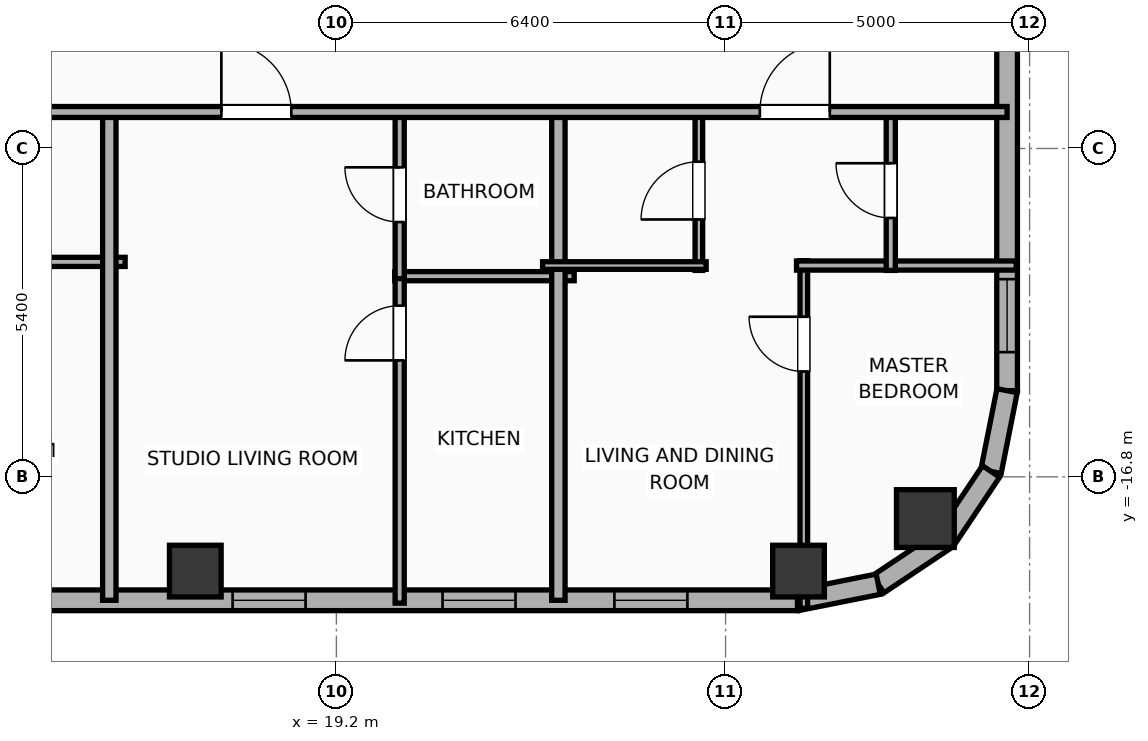
"""IFC4 building model, lengths in metres.
Left out: names, types, materials, properties, quantities, classifications, styles, units other than length and angle.
Written with IfcOpenShell. Run it as: python <this file> out.ifc"""

import sys

from ifc_helpers import new_model, si_unit, direction, frame, frame_2d, origin, origin_2d, place, context, subcontext, project, spatial, rectangle, hollow_rectangle, hollow_circle, extrude, element, fill, save


model = new_model("IFC4")
c1 = context("Model", 3, precision=1e-05, world=origin(), true_north=direction((0.0, 1.0)))
c2 = subcontext(c1, "Body", "Model", "MODEL_VIEW")
j1 = project(units=[si_unit("LENGTHUNIT", "METRE"), si_unit("PLANEANGLEUNIT", "RADIAN")], contexts=[c1])
p1 = place(None, origin())
s1 = spatial("IfcSite", under=j1, at=p1, CompositionType="ELEMENT")
p2 = place(p1, origin())
s2 = spatial("IfcBuilding", under=s1, at=p2, CompositionType="ELEMENT")
p3 = place(p2, frame((0.0, 0.0, 219.7)))
s3 = spatial("IfcBuildingStorey", under=s2, at=p3, CompositionType="ELEMENT", Elevation=219.7)
for number, where, z_axis, x_axis in (
    (1, (16.88, -18.35, 0.0), (0.0, 0.0, 1.0), (1.0, 0.0, 0.0)),
    (2, (26.8, -18.35, 0.0), (0.0, 0.0, 1.0), (1.0, 0.0, 0.0)),
):
    element("IfcColumn", number, at=place(p3, frame(where, z_axis=z_axis, x_axis=x_axis)), inside=s3, PredefinedType="COLUMN", context=c2, shape_type="SweptSolid", body=[
        extrude(hollow_rectangle(XDim=0.85, YDim=0.85, WallThickness=0.028, at=origin_2d()), origin(), (0.0, 0.0, 1.0), 3.9),
    ])
p4 = place(p3, frame((28.886, -17.486, 0.0), z_axis=(0.0, 0.0, 1.0), x_axis=(1.0, 0.0, 0.0)))
e3 = element("IfcColumn", 3, at=p4, inside=s3, PredefinedType="COLUMN", context=c2, shape_type="SweptSolid", body=[
    extrude(hollow_circle(Radius=0.475, WallThickness=0.032, at=origin_2d()), origin(), (0.0, 0.0, 1.0), 3.9),
])
p5 = place(p3, frame((26.783, -18.83, 0.0), z_axis=(0.0, 0.0, 1.0), x_axis=(-1.0, 0.0, 0.0)))
e4 = element("IfcWall", 4, at=p5, inside=s3, PredefinedType="ELEMENTEDWALL", context=c2, shape_type="SweptSolid", body=[
    extrude(rectangle(XDim=49.566, YDim=0.34, at=frame_2d((24.783, 0.0))), origin(), (0.0, 0.0, 1.0), 3.65),
])
p6 = place(p5, frame((23.583, 0.0, 0.75)))
e5 = element("IfcOpeningElement", 5, at=p6, cuts=e4, PredefinedType="OPENING", context=c2, shape_type="SweptSolid", body=[
    extrude(rectangle(XDim=2.4, YDim=2.1, at=frame_2d((1.2, 1.05))), frame((0.0, 0.18, 0.0), z_axis=(0.0, -1.0, 0.0), x_axis=(1.0, 0.0, 0.0)), (0.0, 0.0, 1.0), 0.36),
])
p7 = place(p5, frame((41.756, 0.0, 0.75)))
e6 = element("IfcOpeningElement", 6, at=p7, cuts=e4, PredefinedType="OPENING", context=c2, shape_type="SweptSolid", body=[
    extrude(rectangle(XDim=2.4, YDim=2.1, at=frame_2d((1.2, 1.05))), frame((0.0, 0.18, 0.0), z_axis=(0.0, -1.0, 0.0), x_axis=(1.0, 0.0, 0.0)), (0.0, 0.0, 1.0), 0.36),
])
p8 = place(p5, frame((47.222, 0.0, 0.75)))
e7 = element("IfcOpeningElement", 7, at=p8, cuts=e4, PredefinedType="OPENING", context=c2, shape_type="SweptSolid", body=[
    extrude(rectangle(XDim=1.2, YDim=2.05, at=frame_2d((0.6, 1.025))), frame((0.0, 0.18, 0.0), z_axis=(0.0, -1.0, 0.0), x_axis=(1.0, 0.0, 0.0)), (0.0, 0.0, 1.0), 0.36),
])
p9 = place(p5, frame((45.08, 0.0, 0.75)))
e8 = element("IfcOpeningElement", 8, at=p9, cuts=e4, PredefinedType="OPENING", context=c2, shape_type="SweptSolid", body=[
    extrude(rectangle(XDim=1.2, YDim=2.05, at=frame_2d((0.6, 1.025))), frame((0.0, 0.18, 0.0), z_axis=(0.0, -1.0, 0.0), x_axis=(1.0, 0.0, 0.0)), (0.0, 0.0, 1.0), 0.36),
])
p10 = place(p5, frame((37.289, 0.0, 0.75)))
e9 = element("IfcOpeningElement", 9, at=p10, cuts=e4, PredefinedType="OPENING", context=c2, shape_type="SweptSolid", body=[
    extrude(rectangle(XDim=1.2, YDim=2.05, at=frame_2d((0.6, 1.025))), frame((0.0, 0.18, 0.0), z_axis=(0.0, -1.0, 0.0), x_axis=(1.0, 0.0, 0.0)), (0.0, 0.0, 1.0), 0.36),
])
p11 = place(p5, frame((16.115, 0.0, 0.75)))
e10 = element("IfcOpeningElement", 10, at=p11, cuts=e4, PredefinedType="OPENING", context=c2, shape_type="SweptSolid", body=[
    extrude(rectangle(XDim=1.2, YDim=2.05, at=frame_2d((0.6, 1.025))), frame((0.0, 0.18, 0.0), z_axis=(0.0, -1.0, 0.0), x_axis=(1.0, 0.0, 0.0)), (0.0, 0.0, 1.0), 0.36),
])
p12 = place(p5, frame((12.422, 0.0, 0.75)))
e11 = element("IfcOpeningElement", 11, at=p12, cuts=e4, PredefinedType="OPENING", context=c2, shape_type="SweptSolid", body=[
    extrude(rectangle(XDim=1.2, YDim=2.05, at=frame_2d((0.6, 1.025))), frame((0.0, 0.18, 0.0), z_axis=(0.0, -1.0, 0.0), x_axis=(1.0, 0.0, 0.0)), (0.0, 0.0, 1.0), 0.36),
])
p13 = place(p5, frame((8.09, 0.0, 0.75)))
e12 = element("IfcOpeningElement", 12, at=p13, cuts=e4, PredefinedType="OPENING", context=c2, shape_type="SweptSolid", body=[
    extrude(rectangle(XDim=1.2, YDim=2.05, at=frame_2d((0.6, 1.025))), frame((0.0, 0.18, 0.0), z_axis=(0.0, -1.0, 0.0), x_axis=(1.0, 0.0, 0.0)), (0.0, 0.0, 1.0), 0.36),
])
p14 = place(p5, frame((4.637, 0.0, 0.75)))
e13 = element("IfcOpeningElement", 13, at=p14, cuts=e4, PredefinedType="OPENING", context=c2, shape_type="SweptSolid", body=[
    extrude(rectangle(XDim=1.2, YDim=2.05, at=frame_2d((0.6, 1.025))), frame((0.0, 0.18, 0.0), z_axis=(0.0, -1.0, 0.0), x_axis=(1.0, 0.0, 0.0)), (0.0, 0.0, 1.0), 0.36),
])
p15 = place(p5, frame((1.811, 0.0, 0.75)))
e14 = element("IfcOpeningElement", 14, at=p15, cuts=e4, PredefinedType="OPENING", context=c2, shape_type="SweptSolid", body=[
    extrude(rectangle(XDim=1.2, YDim=2.05, at=frame_2d((0.6, 1.025))), frame((0.0, 0.18, 0.0), z_axis=(0.0, -1.0, 0.0), x_axis=(1.0, 0.0, 0.0)), (0.0, 0.0, 1.0), 0.36),
])
p16 = place(p5, frame((32.253, 0.0, 0.75)))
e15 = element("IfcOpeningElement", 15, at=p16, cuts=e4, PredefinedType="OPENING", context=c2, shape_type="SweptSolid", body=[
    extrude(rectangle(XDim=1.2, YDim=2.05, at=frame_2d((0.6, 1.025))), frame((0.0, 0.18, 0.0), z_axis=(0.0, -1.0, 0.0), x_axis=(1.0, 0.0, 0.0)), (0.0, 0.0, 1.0), 0.36),
])
p17 = place(p5, frame((27.853, 0.0, 0.75)))
e16 = element("IfcOpeningElement", 16, at=p17, cuts=e4, PredefinedType="OPENING", context=c2, shape_type="SweptSolid", body=[
    extrude(rectangle(XDim=1.2, YDim=2.05, at=frame_2d((0.6, 1.025))), frame((0.0, 0.18, 0.0), z_axis=(0.0, -1.0, 0.0), x_axis=(1.0, 0.0, 0.0)), (0.0, 0.0, 1.0), 0.36),
])
p18 = place(p5, frame((20.473, 0.0, 0.75)))
e17 = element("IfcOpeningElement", 17, at=p18, cuts=e4, PredefinedType="OPENING", context=c2, shape_type="SweptSolid", body=[
    extrude(rectangle(XDim=1.2, YDim=2.05, at=frame_2d((0.6, 1.025))), frame((0.0, 0.18, 0.0), z_axis=(0.0, -1.0, 0.0), x_axis=(1.0, 0.0, 0.0)), (0.0, 0.0, 1.0), 0.36),
])
p19 = place(p3, frame((30.23, 16.583, 0.0), z_axis=(0.0, 0.0, 1.0), x_axis=(0.0, -1.0, 0.0)))
e18 = element("IfcWall", 18, at=p19, inside=s3, PredefinedType="ELEMENTEDWALL", context=c2, shape_type="SweptSolid", body=[
    extrude(rectangle(XDim=31.967, YDim=0.34, at=frame_2d((15.983, 0.0))), origin(), (0.0, 0.0, 1.0), 3.65),
])
p20 = place(p19, frame((30.132, 0.0, 0.75)))
e19 = element("IfcOpeningElement", 19, at=p20, cuts=e18, PredefinedType="OPENING", context=c2, shape_type="SweptSolid", body=[
    extrude(rectangle(XDim=1.2, YDim=2.05, at=frame_2d((0.6, 1.025))), frame((0.0, 0.18, 0.0), z_axis=(0.0, -1.0, 0.0), x_axis=(1.0, 0.0, 0.0)), (0.0, 0.0, 1.0), 0.36),
])
p21 = place(p19, frame((11.288, 0.0, 0.75)))
e20 = element("IfcOpeningElement", 20, at=p21, cuts=e18, PredefinedType="OPENING", context=c2, shape_type="SweptSolid", body=[
    extrude(rectangle(XDim=1.2, YDim=2.05, at=frame_2d((0.6, 1.025))), frame((0.0, 0.18, 0.0), z_axis=(0.0, -1.0, 0.0), x_axis=(1.0, 0.0, 0.0)), (0.0, 0.0, 1.0), 0.36),
])
p22 = place(p19, frame((20.538, 0.0, 0.75)))
e21 = element("IfcOpeningElement", 21, at=p22, cuts=e18, PredefinedType="OPENING", context=c2, shape_type="SweptSolid", body=[
    extrude(rectangle(XDim=1.2, YDim=2.05, at=frame_2d((0.6, 1.025))), frame((0.0, 0.18, 0.0), z_axis=(0.0, -1.0, 0.0), x_axis=(1.0, 0.0, 0.0)), (0.0, 0.0, 1.0), 0.36),
])
p23 = place(p3, frame((30.23, -15.383, 0.0), z_axis=(0.0, 0.0, 1.0), x_axis=(-0.195110379894, -0.98078129043, 0.0)))
e22 = element("IfcWall", 22, at=p23, inside=s3, PredefinedType="ELEMENTEDWALL", context=c2, shape_type="SweptSolid", body=[
    extrude(rectangle(XDim=1.354, YDim=0.34, at=frame_2d((0.677, 0.0))), origin(), (0.0, 0.0, 1.0), 3.65),
])
p24 = place(p3, frame((29.966, -16.711, 0.0), z_axis=(0.0, 0.0, 1.0), x_axis=(-0.555584683399, -0.831459956686, 0.0)))
e23 = element("IfcWall", 23, at=p24, inside=s3, PredefinedType="ELEMENTEDWALL", context=c2, shape_type="SweptSolid", body=[
    extrude(rectangle(XDim=1.337, YDim=0.34, at=frame_2d((0.668, 0.0))), origin(), (0.0, 0.0, 1.0), 3.65),
])
p25 = place(p3, frame((29.223, -17.823, 0.0), z_axis=(0.0, 0.0, 1.0), x_axis=(-0.831403586725, -0.555669034571, 0.0)))
e24 = element("IfcWall", 24, at=p25, inside=s3, PredefinedType="ELEMENTEDWALL", context=c2, shape_type="SweptSolid", body=[
    extrude(rectangle(XDim=1.337, YDim=0.34, at=frame_2d((0.668, 0.0))), origin(), (0.0, 0.0, 1.0), 3.65),
])
p26 = place(p3, frame((28.111, -18.566, 0.0), z_axis=(0.0, 0.0, 1.0), x_axis=(-0.980788153188, -0.195075878998, 0.0)))
e25 = element("IfcWall", 25, at=p26, inside=s3, PredefinedType="ELEMENTEDWALL", context=c2, shape_type="SweptSolid", body=[
    extrude(rectangle(XDim=1.354, YDim=0.34, at=frame_2d((0.677, 0.0))), origin(), (0.0, 0.0, 1.0), 3.65),
])
p27 = place(p3, frame((11.936, -13.265, 0.0), z_axis=(0.0, 0.0, 1.0), x_axis=(1.0, 0.0, 0.0)))
e26 = element("IfcWall", 26, at=p27, inside=s3, PredefinedType="PLUMBINGWALL", context=c2, shape_type="SweptSolid", body=[
    extrude(rectangle(XDim=3.79, YDim=0.15, at=frame_2d((1.895, 0.0))), origin(), (0.0, 0.0, 1.0), 3.65),
])
p28 = place(p3, frame((15.466, -18.83, 0.0), z_axis=(0.0, 0.0, 1.0), x_axis=(0.0, 1.0, 0.0)))
e27 = element("IfcWall", 27, at=p28, inside=s3, PredefinedType="PARTITIONING", context=c2, shape_type="SweptSolid", body=[
    extrude(rectangle(XDim=8.11, YDim=0.22, at=frame_2d((4.055, 0.0))), origin(), (0.0, 0.0, 1.0), 3.65),
])
p29 = place(p3, frame((20.161, -13.5, 0.0), z_axis=(0.0, 0.0, 1.0), x_axis=(1.0, 0.0, 0.0)))
e28 = element("IfcWall", 28, at=p29, inside=s3, PredefinedType="PLUMBINGWALL", context=c2, shape_type="SweptSolid", body=[
    extrude(rectangle(XDim=2.95, YDim=0.15, at=frame_2d((1.475, 0.0))), origin(), (0.0, 0.0, 1.0), 3.65),
])
p30 = place(p3, frame((20.241, -18.877, 0.0), z_axis=(0.0, 0.0, 1.0), x_axis=(0.0, 1.0, 0.0)))
e29 = element("IfcWall", 29, at=p30, inside=s3, PredefinedType="PLUMBINGWALL", context=c2, shape_type="SweptSolid", body=[
    extrude(rectangle(XDim=5.417, YDim=0.15, at=frame_2d((2.708, 0.0))), origin(), (0.0, 0.0, 1.0), 3.65),
])
p31 = place(p30, frame((3.992, 0.0, 0.0)))
e30 = element("IfcOpeningElement", 30, at=p31, cuts=e29, PredefinedType="OPENING", context=c2, shape_type="SweptSolid", body=[
    extrude(rectangle(XDim=0.9, YDim=2.05, at=frame_2d((0.45, 1.025))), frame((0.0, 0.085, 0.0), z_axis=(0.0, -1.0, 0.0), x_axis=(1.0, 0.0, 0.0)), (0.0, 0.0, 1.0), 0.17),
])
p32 = place(p3, frame((20.241, -13.54, 0.0), z_axis=(0.0, 0.0, 1.0), x_axis=(0.0, 1.0, 0.0)))
e31 = element("IfcWall", 31, at=p32, inside=s3, PredefinedType="PLUMBINGWALL", context=c2, shape_type="SweptSolid", body=[
    extrude(rectangle(XDim=2.76, YDim=0.15, at=frame_2d((1.38, 0.0))), origin(), (0.0, 0.0, 1.0), 3.65),
])
p33 = place(p32, frame((0.93, 0.0, 0.0)))
e32 = element("IfcOpeningElement", 32, at=p33, cuts=e31, PredefinedType="OPENING", context=c2, shape_type="SweptSolid", body=[
    extrude(rectangle(XDim=0.9, YDim=2.05, at=frame_2d((0.45, 1.025))), frame((0.0, 0.085, 0.0), z_axis=(0.0, -1.0, 0.0), x_axis=(1.0, 0.0, 0.0)), (0.0, 0.0, 1.0), 0.17),
])
p34 = place(p3, frame((22.851, -18.83, 0.0), z_axis=(0.0, 0.0, 1.0), x_axis=(0.0, 1.0, 0.0)))
e33 = element("IfcWall", 33, at=p34, inside=s3, PredefinedType="PARTITIONING", context=c2, shape_type="SweptSolid", body=[
    extrude(rectangle(XDim=8.11, YDim=0.22, at=frame_2d((4.055, 0.0))), origin(), (0.0, 0.0, 1.0), 3.65),
])
p35 = place(p3, frame((26.887, -18.962, 0.0), z_axis=(0.0, 0.0, 1.0), x_axis=(0.0, 1.0, 0.0)))
e34 = element("IfcWall", 34, at=p35, inside=s3, PredefinedType="PARTITIONING", context=c2, shape_type="SweptSolid", body=[
    extrude(rectangle(XDim=5.717, YDim=0.125, at=frame_2d((2.859, 0.0))), origin(), (0.0, 0.0, 1.0), 3.65),
])
p36 = place(p35, frame((3.895, 0.0, 0.0)))
e35 = element("IfcOpeningElement", 35, at=p36, cuts=e34, PredefinedType="OPENING", context=c2, shape_type="SweptSolid", body=[
    extrude(rectangle(XDim=0.9, YDim=2.05, at=frame_2d((0.45, 1.025))), frame((0.0, 0.073, 0.0), z_axis=(0.0, -1.0, 0.0), x_axis=(1.0, 0.0, 0.0)), (0.0, 0.0, 1.0), 0.145),
])
p37 = place(p3, frame((26.767, -13.325, 0.0), z_axis=(0.0, 0.0, 1.0), x_axis=(1.0, 0.0, 0.0)))
e36 = element("IfcWall", 36, at=p37, inside=s3, PredefinedType="PLUMBINGWALL", context=c2, shape_type="SweptSolid", body=[
    extrude(rectangle(XDim=3.613, YDim=0.15, at=frame_2d((1.806, 0.0))), origin(), (0.0, 0.0, 1.0), 3.65),
])
p38 = place(p3, frame((25.161, -13.405, 0.0), z_axis=(0.0, 0.0, 1.0), x_axis=(0.0, 1.0, 0.0)))
e37 = element("IfcWall", 37, at=p38, inside=s3, PredefinedType="PARTITIONING", context=c2, shape_type="SweptSolid", body=[
    extrude(rectangle(XDim=2.625, YDim=0.125, at=frame_2d((1.312, 0.0))), origin(), (0.0, 0.0, 1.0), 3.65),
])
p39 = place(p38, frame((0.837, 0.0, 0.0)))
e38 = element("IfcOpeningElement", 38, at=p39, cuts=e37, PredefinedType="OPENING", context=c2, shape_type="SweptSolid", body=[
    extrude(rectangle(XDim=0.95, YDim=2.05, at=frame_2d((0.475, 1.025))), frame((0.0, 0.073, 0.0), z_axis=(0.0, -1.0, 0.0), x_axis=(1.0, 0.0, 0.0)), (0.0, 0.0, 1.0), 0.145),
])
p40 = place(p3, frame((22.591, -13.325, 0.0), z_axis=(0.0, 0.0, 1.0), x_axis=(1.0, 0.0, 0.0)))
e39 = element("IfcWall", 39, at=p40, inside=s3, PredefinedType="PARTITIONING", context=c2, shape_type="SweptSolid", body=[
    extrude(rectangle(XDim=2.69, YDim=0.125, at=frame_2d((1.345, 0.0))), origin(), (0.0, 0.0, 1.0), 3.65),
])
p41 = place(p3, frame((28.317, -13.405, 0.0), z_axis=(0.0, 0.0, 1.0), x_axis=(0.0, 1.0, 0.0)))
e40 = element("IfcWall", 40, at=p41, inside=s3, PredefinedType="PLUMBINGWALL", context=c2, shape_type="SweptSolid", body=[
    extrude(rectangle(XDim=2.625, YDim=0.15, at=frame_2d((1.312, 0.0))), origin(), (0.0, 0.0, 1.0), 3.65),
])
p42 = place(p41, frame((0.863, 0.0, 0.0)))
e41 = element("IfcOpeningElement", 41, at=p42, cuts=e40, PredefinedType="OPENING", context=c2, shape_type="SweptSolid", body=[
    extrude(rectangle(XDim=0.9, YDim=2.05, at=frame_2d((0.45, 1.025))), frame((0.0, 0.085, 0.0), z_axis=(0.0, -1.0, 0.0), x_axis=(1.0, 0.0, 0.0)), (0.0, 0.0, 1.0), 0.17),
])
p43 = place(p3, frame((8.08, -10.8, 0.0), z_axis=(0.0, 0.0, 1.0), x_axis=(1.0, 0.0, 0.0)))
e42 = element("IfcWall", 42, at=p43, inside=s3, PredefinedType="PARTITIONING", context=c2, shape_type="SweptSolid", body=[
    extrude(rectangle(XDim=22.15, YDim=0.18, at=frame_2d((11.075, 0.0))), origin(), (0.0, 0.0, 1.0), 3.65),
])
p44 = place(p43, frame((3.283, 0.0, 0.0)))
e43 = element("IfcOpeningElement", 43, at=p44, cuts=e42, PredefinedType="OPENING", context=c2, shape_type="SweptSolid", body=[
    extrude(rectangle(XDim=1.15, YDim=2.05, at=frame_2d((0.575, 1.025))), frame((0.0, 0.1, 0.0), z_axis=(0.0, -1.0, 0.0), x_axis=(1.0, 0.0, 0.0)), (0.0, 0.0, 1.0), 0.2),
])
p45 = place(p43, frame((9.229, 0.0, 0.0)))
e44 = element("IfcOpeningElement", 44, at=p45, cuts=e42, PredefinedType="OPENING", context=c2, shape_type="SweptSolid", body=[
    extrude(rectangle(XDim=1.15, YDim=2.05, at=frame_2d((0.575, 1.025))), frame((0.0, 0.1, 0.0), z_axis=(0.0, -1.0, 0.0), x_axis=(1.0, 0.0, 0.0)), (0.0, 0.0, 1.0), 0.2),
])
p46 = place(p43, frame((18.084, 0.0, 0.0)))
e45 = element("IfcOpeningElement", 45, at=p46, cuts=e42, PredefinedType="OPENING", context=c2, shape_type="SweptSolid", body=[
    extrude(rectangle(XDim=1.15, YDim=2.05, at=frame_2d((0.575, 1.025))), frame((0.0, 0.1, 0.0), z_axis=(0.0, -1.0, 0.0), x_axis=(1.0, 0.0, 0.0)), (0.0, 0.0, 1.0), 0.2),
])
p47 = place(p13, origin())
e46 = element("IfcWindow", 46, at=p47, inside=s3, PartitioningType="SINGLE_PANEL", PredefinedType="WINDOW", context=c2, shape_type="SweptSolid", body=[
    extrude(rectangle(XDim=1.2, YDim=2.05, at=frame_2d((0.6, 1.025))), frame((0.0, 0.03, 0.0), z_axis=(0.0, -1.0, 0.0), x_axis=(1.0, 0.0, 0.0)), (0.0, 0.0, 1.0), 0.06),
])
fill(e12, e46)
p48 = place(p14, origin())
e47 = element("IfcWindow", 47, at=p48, inside=s3, PartitioningType="SINGLE_PANEL", PredefinedType="WINDOW", context=c2, shape_type="SweptSolid", body=[
    extrude(rectangle(XDim=1.2, YDim=2.05, at=frame_2d((0.6, 1.025))), frame((0.0, 0.03, 0.0), z_axis=(0.0, -1.0, 0.0), x_axis=(1.0, 0.0, 0.0)), (0.0, 0.0, 1.0), 0.06),
])
fill(e13, e47)
p49 = place(p15, origin())
e48 = element("IfcWindow", 48, at=p49, inside=s3, PartitioningType="SINGLE_PANEL", PredefinedType="WINDOW", context=c2, shape_type="SweptSolid", body=[
    extrude(rectangle(XDim=1.2, YDim=2.05, at=frame_2d((0.6, 1.025))), frame((0.0, 0.03, 0.0), z_axis=(0.0, -1.0, 0.0), x_axis=(1.0, 0.0, 0.0)), (0.0, 0.0, 1.0), 0.06),
])
fill(e14, e48)
p50 = place(p20, origin())
e49 = element("IfcWindow", 49, at=p50, inside=s3, PartitioningType="SINGLE_PANEL", PredefinedType="WINDOW", context=c2, shape_type="SweptSolid", body=[
    extrude(rectangle(XDim=1.2, YDim=2.05, at=frame_2d((0.6, 1.025))), frame((0.0, 0.03, 0.0), z_axis=(0.0, -1.0, 0.0), x_axis=(1.0, 0.0, 0.0)), (0.0, 0.0, 1.0), 0.06),
])
fill(e19, e49)
p51 = place(p31, origin())
e50 = element("IfcDoor", 50, at=p51, inside=s3, OperationType="SINGLE_SWING_LEFT", PredefinedType="DOOR", context=c2, shape_type="SweptSolid", body=[
    extrude(rectangle(XDim=0.9, YDim=2.05, at=frame_2d((0.45, 1.025))), frame((0.0, 0.025, 0.0), z_axis=(0.0, -1.0, 0.0), x_axis=(1.0, 0.0, 0.0)), (0.0, 0.0, 1.0), 0.05),
])
fill(e30, e50)
p52 = place(p33, origin())
e51 = element("IfcDoor", 51, at=p52, inside=s3, OperationType="SINGLE_SWING_RIGHT", PredefinedType="DOOR", context=c2, shape_type="SweptSolid", body=[
    extrude(rectangle(XDim=0.9, YDim=2.05, at=frame_2d((0.45, 1.025))), frame((0.0, 0.025, 0.0), z_axis=(0.0, -1.0, 0.0), x_axis=(1.0, 0.0, 0.0)), (0.0, 0.0, 1.0), 0.05),
])
fill(e32, e51)
p53 = place(p36, origin())
e52 = element("IfcDoor", 52, at=p53, inside=s3, OperationType="SINGLE_SWING_RIGHT", PredefinedType="DOOR", context=c2, shape_type="SweptSolid", body=[
    extrude(rectangle(XDim=0.9, YDim=2.05, at=frame_2d((0.45, 1.025))), frame((0.0, 0.025, 0.0), z_axis=(0.0, -1.0, 0.0), x_axis=(1.0, 0.0, 0.0)), (0.0, 0.0, 1.0), 0.05),
])
fill(e35, e52)
p54 = place(p39, origin())
e53 = element("IfcDoor", 53, at=p54, inside=s3, OperationType="SINGLE_SWING_LEFT", PredefinedType="DOOR", context=c2, shape_type="SweptSolid", body=[
    extrude(rectangle(XDim=0.95, YDim=2.05, at=frame_2d((0.475, 1.025))), frame((0.0, 0.025, 0.0), z_axis=(0.0, -1.0, 0.0), x_axis=(1.0, 0.0, 0.0)), (0.0, 0.0, 1.0), 0.05),
])
fill(e38, e53)
p55 = place(p42, origin())
e54 = element("IfcDoor", 54, at=p55, inside=s3, OperationType="SINGLE_SWING_RIGHT", PredefinedType="DOOR", context=c2, shape_type="SweptSolid", body=[
    extrude(rectangle(XDim=0.9, YDim=2.05, at=frame_2d((0.45, 1.025))), frame((0.0, 0.025, 0.0), z_axis=(0.0, -1.0, 0.0), x_axis=(1.0, 0.0, 0.0)), (0.0, 0.0, 1.0), 0.05),
])
fill(e41, e54)
p56 = place(p45, origin())
e55 = element("IfcDoor", 55, at=p56, inside=s3, OperationType="SINGLE_SWING_LEFT", PredefinedType="DOOR", context=c2, shape_type="SweptSolid", body=[
    extrude(rectangle(XDim=1.15, YDim=2.05, at=frame_2d((0.575, 1.025))), frame((0.0, 0.025, 0.0), z_axis=(0.0, -1.0, 0.0), x_axis=(1.0, 0.0, 0.0)), (0.0, 0.0, 1.0), 0.05),
])
fill(e44, e55)
p57 = place(p46, origin())
e56 = element("IfcDoor", 56, at=p57, inside=s3, OperationType="SINGLE_SWING_RIGHT", PredefinedType="DOOR", context=c2, shape_type="SweptSolid", body=[
    extrude(rectangle(XDim=1.15, YDim=2.05, at=frame_2d((0.575, 1.025))), frame((0.0, 0.025, 0.0), z_axis=(0.0, -1.0, 0.0), x_axis=(1.0, 0.0, 0.0)), (0.0, 0.0, 1.0), 0.05),
])
fill(e45, e56)
save(model, sys.argv[1])
